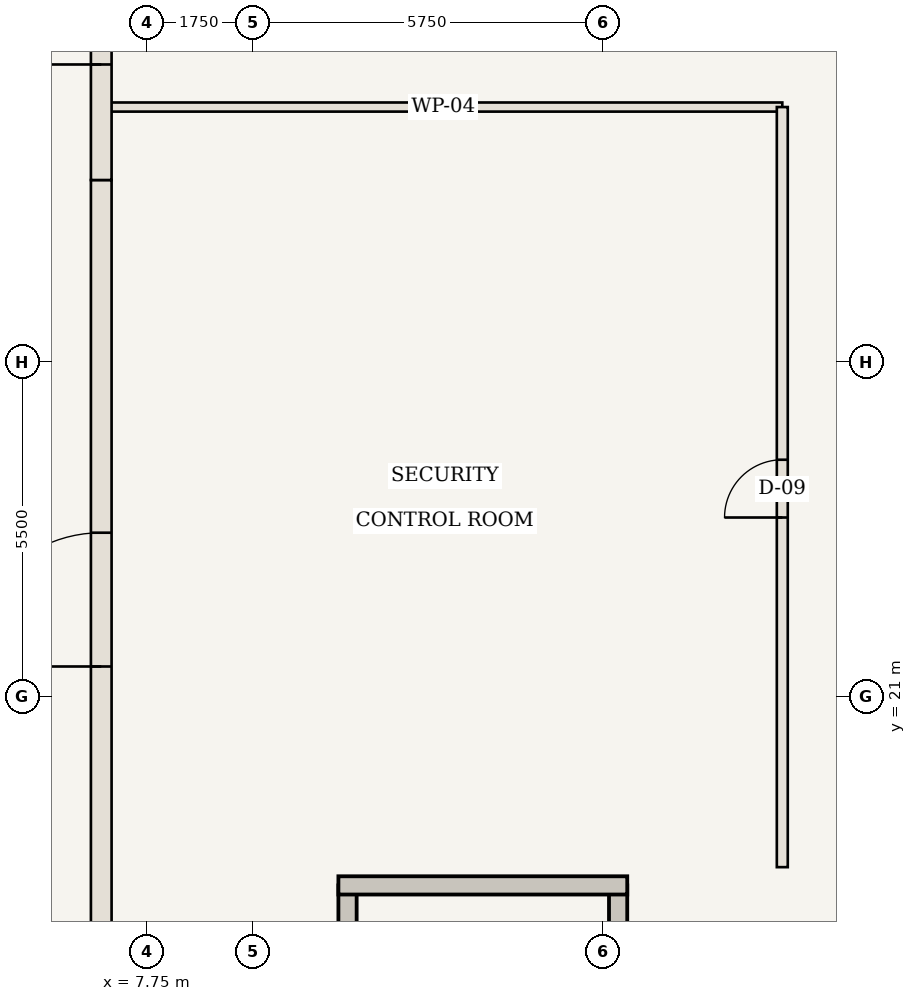
"""IFC4 building model, lengths in metres.
Left out: names, types, materials, properties, quantities, classifications, styles, units other than length and angle.
Written with IfcOpenShell. Run it as: python <this file> out.ifc"""

import sys

from ifc_helpers import new_model, si_unit, direction, frame, frame_2d, origin, place, context, subcontext, project, spatial, rectangle, extrude, element, fill, save


model = new_model("IFC4")
c1 = context("Model", 3, precision=1e-05, world=origin(), true_north=direction((0.0, 1.0)))
c2 = subcontext(c1, "Body", "Model", "MODEL_VIEW")
j1 = project(units=[si_unit("LENGTHUNIT", "METRE"), si_unit("PLANEANGLEUNIT", "RADIAN")], contexts=[c1])
p1 = place(None, origin())
s1 = spatial("IfcSite", under=j1, at=p1, CompositionType="ELEMENT")
p2 = place(p1, origin())
s2 = spatial("IfcBuilding", under=s1, at=p2, CompositionType="ELEMENT")
p3 = place(p2, origin())
s3 = spatial("IfcBuildingStorey", under=s2, at=p3, CompositionType="ELEMENT", Elevation=0.0)
p4 = place(p3, frame((11.05, 7.4, 0.0), z_axis=(0.0, 0.0, 1.0), x_axis=(0.0, 1.0, 0.0)))
e1 = element("IfcWall", 1, at=p4, inside=s3, PredefinedType="SHEAR", context=c2, shape_type="SweptSolid", body=[
    extrude(rectangle(XDim=10.5, YDim=0.3, at=frame_2d((5.25, 0.0))), origin(), (0.0, 0.0, 1.0), 6.41),
])
p5 = place(p3, frame((15.5, 7.4, 0.0), z_axis=(0.0, 0.0, 1.0), x_axis=(0.0, 1.0, 0.0)))
e2 = element("IfcWall", 2, at=p5, inside=s3, PredefinedType="SHEAR", context=c2, shape_type="SweptSolid", body=[
    extrude(rectangle(XDim=10.5, YDim=0.3, at=frame_2d((5.25, 0.0))), origin(), (0.0, 0.0, 1.0), 6.41),
])
p6 = place(p5, frame((0.58, 0.0, 0.0)))
e3 = element("IfcOpeningElement", 3, at=p6, cuts=e2, PredefinedType="OPENING", context=c2, shape_type="SweptSolid", body=[
    extrude(rectangle(XDim=1.15, YDim=2.15, at=frame_2d((0.575, 1.075))), frame((0.0, 0.16, 0.0), z_axis=(0.0, -1.0, 0.0), x_axis=(1.0, 0.0, 0.0)), (0.0, 0.0, 1.0), 0.32),
])
p7 = place(p3, frame((10.9, 17.9, 0.0), z_axis=(0.0, 0.0, 1.0), x_axis=(1.0, 0.0, 0.0)))
e4 = element("IfcWall", 4, at=p7, inside=s3, PredefinedType="SHEAR", context=c2, shape_type="SweptSolid", body=[
    extrude(rectangle(XDim=4.75, YDim=0.3, at=frame_2d((2.375, 0.0))), origin(), (0.0, 0.0, 1.0), 6.41),
])
p8 = place(p3, frame((7.05, 30.7, 0.0), z_axis=(0.0, 0.0, 1.0), x_axis=(1.0, 0.0, 0.0)))
e5 = element("IfcWall", 5, at=p8, inside=s3, PredefinedType="STANDARD", context=c2, shape_type="SweptSolid", body=[
    extrude(rectangle(XDim=11.15, YDim=0.15, at=frame_2d((5.575, 0.0))), origin(), (0.0, 0.0, 1.0), 6.41),
])
p9 = place(p3, frame((18.2, 18.2, 0.0), z_axis=(0.0, 0.0, 1.0), x_axis=(0.0, 1.0, 0.0)))
e6 = element("IfcWall", 6, at=p9, inside=s3, PredefinedType="STANDARD", context=c2, shape_type="SweptSolid", body=[
    extrude(rectangle(XDim=12.5, YDim=0.18, at=frame_2d((6.25, 0.0))), origin(), (0.0, 0.0, 1.0), 6.41),
])
p10 = place(p9, frame((5.75, 0.0, 0.0)))
e7 = element("IfcOpeningElement", 7, at=p10, cuts=e6, PredefinedType="OPENING", context=c2, shape_type="SweptSolid", body=[
    extrude(rectangle(XDim=0.95, YDim=2.15, at=frame_2d((0.475, 1.075))), frame((0.0, 0.1, 0.0), z_axis=(0.0, -1.0, 0.0), x_axis=(1.0, 0.0, 0.0)), (0.0, 0.0, 1.0), 0.2),
])
p11 = place(p3, frame((7.0, 7.0, 0.0), z_axis=(0.0, 0.0, 1.0), x_axis=(0.0, 1.0, 0.0)))
e8 = element("IfcWall", 8, at=p11, inside=s3, PredefinedType="USERDEFINED", context=c2, shape_type="SweptSolid", body=[
    extrude(rectangle(XDim=22.5, YDim=0.34, at=frame_2d((11.25, 0.0))), origin(), (0.0, 0.0, 1.0), 5.51),
])
p12 = place(p11, frame((14.5, 0.0, 0.0)))
e9 = element("IfcOpeningElement", 9, at=p12, cuts=e8, PredefinedType="OPENING", context=c2, shape_type="SweptSolid", body=[
    extrude(rectangle(XDim=2.2, YDim=2.4, at=frame_2d((1.1, 1.2))), frame((0.0, 0.18, 0.0), z_axis=(0.0, -1.0, 0.0), x_axis=(1.0, 0.0, 0.0)), (0.0, 0.0, 1.0), 0.36),
])
p13 = place(p11, frame((4.5, 0.0, 0.9)))
e10 = element("IfcOpeningElement", 10, at=p13, cuts=e8, PredefinedType="OPENING", context=c2, shape_type="SweptSolid", body=[
    extrude(rectangle(XDim=3.6, YDim=2.6, at=frame_2d((1.8, 1.3))), frame((0.0, 0.18, 0.0), z_axis=(0.0, -1.0, 0.0), x_axis=(1.0, 0.0, 0.0)), (0.0, 0.0, 1.0), 0.36),
])
p14 = place(p3, frame((7.0, 29.5, 0.0), z_axis=(0.0, 0.0, 1.0), x_axis=(0.0, 1.0, 0.0)))
e11 = element("IfcWall", 11, at=p14, inside=s3, PredefinedType="USERDEFINED", context=c2, shape_type="SweptSolid", body=[
    extrude(rectangle(XDim=6.0, YDim=0.34, at=frame_2d((3.0, 0.0))), origin(), (0.0, 0.0, 1.0), 5.51),
])
p15 = place(p14, frame((1.9, 0.0, 0.0)))
e12 = element("IfcOpeningElement", 12, at=p15, cuts=e11, PredefinedType="OPENING", context=c2, shape_type="SweptSolid", body=[
    extrude(rectangle(XDim=2.2, YDim=2.4, at=frame_2d((1.1, 1.2))), frame((0.0, 0.18, 0.0), z_axis=(0.0, -1.0, 0.0), x_axis=(1.0, 0.0, 0.0)), (0.0, 0.0, 1.0), 0.36),
])
p16 = place(p10, origin())
e13 = element("IfcDoor", 13, at=p16, inside=s3, OperationType="SINGLE_SWING_LEFT", PredefinedType="DOOR", context=c2, shape_type="SweptSolid", body=[
    extrude(rectangle(XDim=0.95, YDim=2.15, at=frame_2d((0.475, 1.075))), frame((0.0, 0.025, 0.0), z_axis=(0.0, -1.0, 0.0), x_axis=(1.0, 0.0, 0.0)), (0.0, 0.0, 1.0), 0.05),
])
fill(e7, e13)
p17 = place(p12, origin())
e14 = element("IfcDoor", 14, at=p17, inside=s3, OperationType="DOUBLE_DOOR_SINGLE_SWING", PredefinedType="DOOR", context=c2, shape_type="SweptSolid", body=[
    extrude(rectangle(XDim=2.2, YDim=2.4, at=frame_2d((1.1, 1.2))), frame((0.0, 0.025, 0.0), z_axis=(0.0, -1.0, 0.0), x_axis=(1.0, 0.0, 0.0)), (0.0, 0.0, 1.0), 0.05),
])
fill(e9, e14)
p18 = place(p15, origin())
e15 = element("IfcDoor", 15, at=p18, inside=s3, OperationType="DOUBLE_DOOR_SINGLE_SWING", PredefinedType="DOOR", context=c2, shape_type="SweptSolid", body=[
    extrude(rectangle(XDim=2.2, YDim=2.4, at=frame_2d((1.1, 1.2))), frame((0.0, 0.025, 0.0), z_axis=(0.0, -1.0, 0.0), x_axis=(1.0, 0.0, 0.0)), (0.0, 0.0, 1.0), 0.05),
])
fill(e12, e15)
save(model, sys.argv[1])
